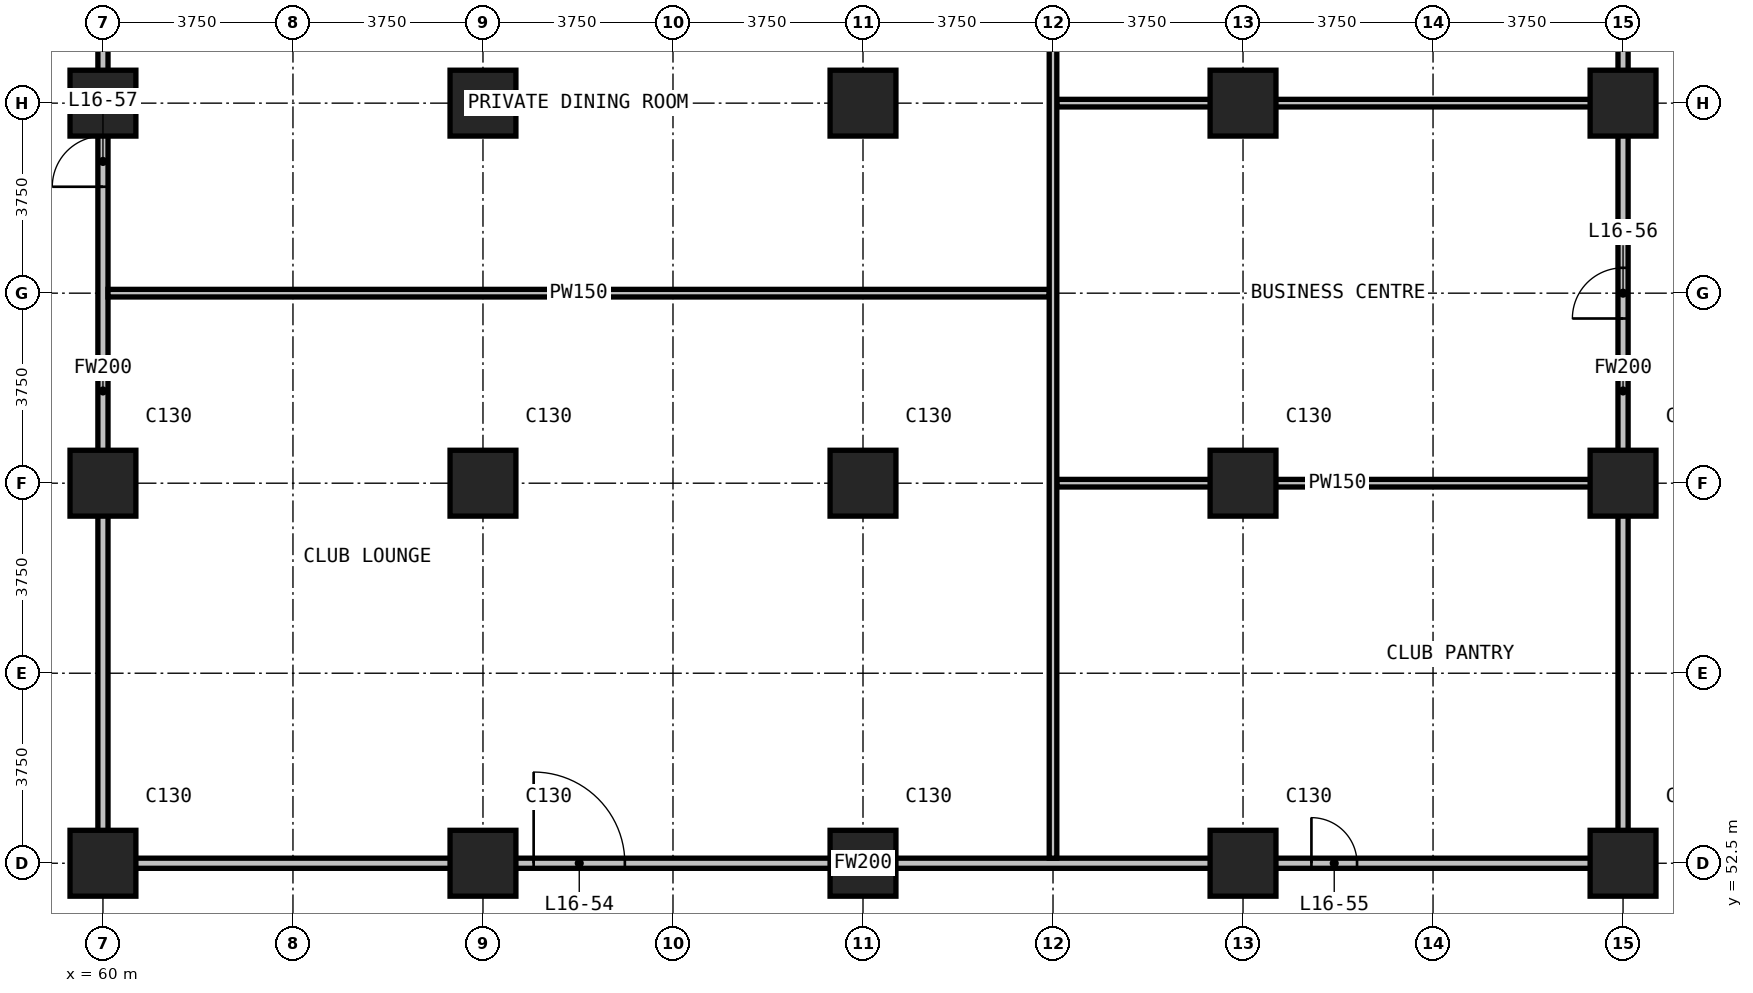
"""IFC4 building model, lengths in metres.
Left out: names, types, materials, properties, quantities, classifications, styles, units other than length and angle.
Written with IfcOpenShell. Run it as: python <this file> out.ifc"""

import sys

from ifc_helpers import new_model, si_unit, direction, frame, frame_2d, origin, origin_2d, place, context, subcontext, project, spatial, rectangle, extrude, element, fill, save


model = new_model("IFC4")
c1 = context("Model", 3, precision=1e-05, world=origin(), true_north=direction((0.0, 1.0)))
c2 = subcontext(c1, "Body", "Model", "MODEL_VIEW")
j1 = project(units=[si_unit("LENGTHUNIT", "METRE"), si_unit("PLANEANGLEUNIT", "RADIAN")], contexts=[c1])
p1 = place(None, origin())
s1 = spatial("IfcSite", under=j1, at=p1, CompositionType="ELEMENT")
p2 = place(p1, origin())
s2 = spatial("IfcBuilding", under=s1, at=p2, CompositionType="ELEMENT")
p3 = place(p2, frame((0.0, 0.0, 72.5)))
s3 = spatial("IfcBuildingStorey", under=s2, at=p3, CompositionType="ELEMENT", Elevation=72.5)
for number, where, z_axis, x_axis in (
    (1, (60.0, 52.5, 0.0), (0.0, 0.0, 1.0), (1.0, 0.0, 0.0)),
    (2, (60.0, 60.0, 0.0), (0.0, 0.0, 1.0), (1.0, 0.0, 0.0)),
    (3, (60.0, 67.5, 0.0), (0.0, 0.0, 1.0), (1.0, 0.0, 0.0)),
    (4, (67.5, 52.5, 0.0), (0.0, 0.0, 1.0), (1.0, 0.0, 0.0)),
    (5, (67.5, 60.0, 0.0), (0.0, 0.0, 1.0), (1.0, 0.0, 0.0)),
    (6, (67.5, 67.5, 0.0), (0.0, 0.0, 1.0), (1.0, 0.0, 0.0)),
    (7, (75.0, 52.5, 0.0), (0.0, 0.0, 1.0), (1.0, 0.0, 0.0)),
    (8, (75.0, 60.0, 0.0), (0.0, 0.0, 1.0), (1.0, 0.0, 0.0)),
    (9, (75.0, 67.5, 0.0), (0.0, 0.0, 1.0), (1.0, 0.0, 0.0)),
    (10, (82.5, 52.5, 0.0), (0.0, 0.0, 1.0), (1.0, 0.0, 0.0)),
    (11, (82.5, 60.0, 0.0), (0.0, 0.0, 1.0), (1.0, 0.0, 0.0)),
    (12, (82.5, 67.5, 0.0), (0.0, 0.0, 1.0), (1.0, 0.0, 0.0)),
    (13, (90.0, 52.5, 0.0), (0.0, 0.0, 1.0), (1.0, 0.0, 0.0)),
    (14, (90.0, 60.0, 0.0), (0.0, 0.0, 1.0), (1.0, 0.0, 0.0)),
    (15, (90.0, 67.5, 0.0), (0.0, 0.0, 1.0), (1.0, 0.0, 0.0)),
):
    element("IfcColumn", number, at=place(p3, frame(where, z_axis=z_axis, x_axis=x_axis)), inside=s3, PredefinedType="COLUMN", context=c2, shape_type="SweptSolid", body=[
        extrude(rectangle(XDim=1.3, YDim=1.3, at=origin_2d()), origin(), (0.0, 0.0, 1.0), 3.3),
    ])
p4 = place(p3, frame((60.1, 52.5, 0.0), z_axis=(0.0, 0.0, 1.0), x_axis=(1.0, 0.0, 0.0)))
e16 = element("IfcWall", 16, at=p4, inside=s3, PredefinedType="PARTITIONING", context=c2, shape_type="SweptSolid", body=[
    extrude(rectangle(XDim=29.8, YDim=0.2, at=frame_2d((14.9, 0.0))), origin(), (0.0, 0.0, 1.0), 3.0),
])
p5 = place(p4, frame((8.4, 0.0, 0.0)))
e17 = element("IfcOpeningElement", 17, at=p5, cuts=e16, PredefinedType="OPENING", context=c2, shape_type="SweptSolid", body=[
    extrude(rectangle(XDim=1.8, YDim=2.2, at=frame_2d((0.9, 1.1))), frame((0.0, 0.11, 0.0), z_axis=(0.0, -1.0, 0.0), x_axis=(1.0, 0.0, 0.0)), (0.0, 0.0, 1.0), 0.22),
])
p6 = place(p4, frame((23.75, 0.0, 0.0)))
e18 = element("IfcOpeningElement", 18, at=p6, cuts=e16, PredefinedType="OPENING", context=c2, shape_type="SweptSolid", body=[
    extrude(rectangle(XDim=0.9, YDim=2.2, at=frame_2d((0.45, 1.1))), frame((0.0, 0.11, 0.0), z_axis=(0.0, -1.0, 0.0), x_axis=(1.0, 0.0, 0.0)), (0.0, 0.0, 1.0), 0.22),
])
p7 = place(p3, frame((60.0, 52.4, 0.0), z_axis=(0.0, 0.0, 1.0), x_axis=(0.0, 1.0, 0.0)))
e19 = element("IfcWall", 19, at=p7, inside=s3, PredefinedType="PARTITIONING", context=c2, shape_type="SweptSolid", body=[
    extrude(rectangle(XDim=18.84, YDim=0.2, at=frame_2d((9.42, 0.0))), origin(), (0.0, 0.0, 1.0), 3.0),
])
p8 = place(p7, frame((13.45, 0.0, 0.0)))
e20 = element("IfcOpeningElement", 20, at=p8, cuts=e19, PredefinedType="OPENING", context=c2, shape_type="SweptSolid", body=[
    extrude(rectangle(XDim=1.0, YDim=2.2, at=frame_2d((0.5, 1.1))), frame((0.0, 0.11, 0.0), z_axis=(0.0, -1.0, 0.0), x_axis=(1.0, 0.0, 0.0)), (0.0, 0.0, 1.0), 0.22),
])
p9 = place(p3, frame((90.0, 52.4, 0.0), z_axis=(0.0, 0.0, 1.0), x_axis=(0.0, 1.0, 0.0)))
e21 = element("IfcWall", 21, at=p9, inside=s3, PredefinedType="PARTITIONING", context=c2, shape_type="SweptSolid", body=[
    extrude(rectangle(XDim=18.84, YDim=0.2, at=frame_2d((9.42, 0.0))), origin(), (0.0, 0.0, 1.0), 3.0),
])
p10 = place(p9, frame((10.85, 0.0, 0.0)))
e22 = element("IfcOpeningElement", 22, at=p10, cuts=e21, PredefinedType="OPENING", context=c2, shape_type="SweptSolid", body=[
    extrude(rectangle(XDim=1.0, YDim=2.2, at=frame_2d((0.5, 1.1))), frame((0.0, 0.11, 0.0), z_axis=(0.0, -1.0, 0.0), x_axis=(1.0, 0.0, 0.0)), (0.0, 0.0, 1.0), 0.22),
])
p11 = place(p9, frame((16.5, 0.0, 0.0)))
e23 = element("IfcOpeningElement", 23, at=p11, cuts=e21, PredefinedType="OPENING", context=c2, shape_type="SweptSolid", body=[
    extrude(rectangle(XDim=0.9, YDim=2.2, at=frame_2d((0.45, 1.1))), frame((0.0, 0.11, 0.0), z_axis=(0.0, -1.0, 0.0), x_axis=(1.0, 0.0, 0.0)), (0.0, 0.0, 1.0), 0.22),
])
p12 = place(p3, frame((78.825, 60.0, 0.0), z_axis=(0.0, 0.0, 1.0), x_axis=(1.0, 0.0, 0.0)))
e24 = element("IfcWall", 24, at=p12, inside=s3, PredefinedType="PARTITIONING", context=c2, shape_type="SweptSolid", body=[
    extrude(rectangle(XDim=11.075, YDim=0.15, at=frame_2d((5.538, 0.0))), origin(), (0.0, 0.0, 1.0), 3.0),
])
p13 = place(p3, frame((60.1, 63.75, 0.0), z_axis=(0.0, 0.0, 1.0), x_axis=(1.0, 0.0, 0.0)))
e25 = element("IfcWall", 25, at=p13, inside=s3, PredefinedType="PARTITIONING", context=c2, shape_type="SweptSolid", body=[
    extrude(rectangle(XDim=18.575, YDim=0.15, at=frame_2d((9.288, 0.0))), origin(), (0.0, 0.0, 1.0), 3.0),
])
p14 = place(p3, frame((78.825, 67.5, 0.0), z_axis=(0.0, 0.0, 1.0), x_axis=(1.0, 0.0, 0.0)))
e26 = element("IfcWall", 26, at=p14, inside=s3, PredefinedType="PARTITIONING", context=c2, shape_type="SweptSolid", body=[
    extrude(rectangle(XDim=11.075, YDim=0.15, at=frame_2d((5.538, 0.0))), origin(), (0.0, 0.0, 1.0), 3.0),
])
p15 = place(p3, frame((78.75, 52.6, 0.0), z_axis=(0.0, 0.0, 1.0), x_axis=(0.0, 1.0, 0.0)))
e27 = element("IfcWall", 27, at=p15, inside=s3, PredefinedType="PARTITIONING", context=c2, shape_type="SweptSolid", body=[
    extrude(rectangle(XDim=18.64, YDim=0.15, at=frame_2d((9.32, 0.0))), origin(), (0.0, 0.0, 1.0), 3.0),
])
p16 = place(p5, origin())
e28 = element("IfcDoor", 28, at=p16, inside=s3, OperationType="DOUBLE_DOOR_SINGLE_SWING", PredefinedType="DOOR", context=c2, shape_type="SweptSolid", body=[
    extrude(rectangle(XDim=1.8, YDim=2.2, at=frame_2d((0.9, 1.1))), frame((0.0, 0.025, 0.0), z_axis=(0.0, -1.0, 0.0), x_axis=(1.0, 0.0, 0.0)), (0.0, 0.0, 1.0), 0.05),
])
fill(e17, e28)
p17 = place(p6, origin())
e29 = element("IfcDoor", 29, at=p17, inside=s3, OperationType="SINGLE_SWING_LEFT", PredefinedType="DOOR", context=c2, shape_type="SweptSolid", body=[
    extrude(rectangle(XDim=0.9, YDim=2.2, at=frame_2d((0.45, 1.1))), frame((0.0, 0.025, 0.0), z_axis=(0.0, -1.0, 0.0), x_axis=(1.0, 0.0, 0.0)), (0.0, 0.0, 1.0), 0.05),
])
fill(e18, e29)
p18 = place(p10, origin())
e30 = element("IfcDoor", 30, at=p18, inside=s3, OperationType="SINGLE_SWING_RIGHT", PredefinedType="DOOR", context=c2, shape_type="SweptSolid", body=[
    extrude(rectangle(XDim=1.0, YDim=2.2, at=frame_2d((0.5, 1.1))), frame((0.0, 0.025, 0.0), z_axis=(0.0, -1.0, 0.0), x_axis=(1.0, 0.0, 0.0)), (0.0, 0.0, 1.0), 0.05),
])
fill(e22, e30)
p19 = place(p8, origin())
e31 = element("IfcDoor", 31, at=p19, inside=s3, OperationType="SINGLE_SWING_RIGHT", PredefinedType="DOOR", context=c2, shape_type="SweptSolid", body=[
    extrude(rectangle(XDim=1.0, YDim=2.2, at=frame_2d((0.5, 1.1))), frame((0.0, 0.025, 0.0), z_axis=(0.0, -1.0, 0.0), x_axis=(1.0, 0.0, 0.0)), (0.0, 0.0, 1.0), 0.05),
])
fill(e20, e31)
save(model, sys.argv[1])
